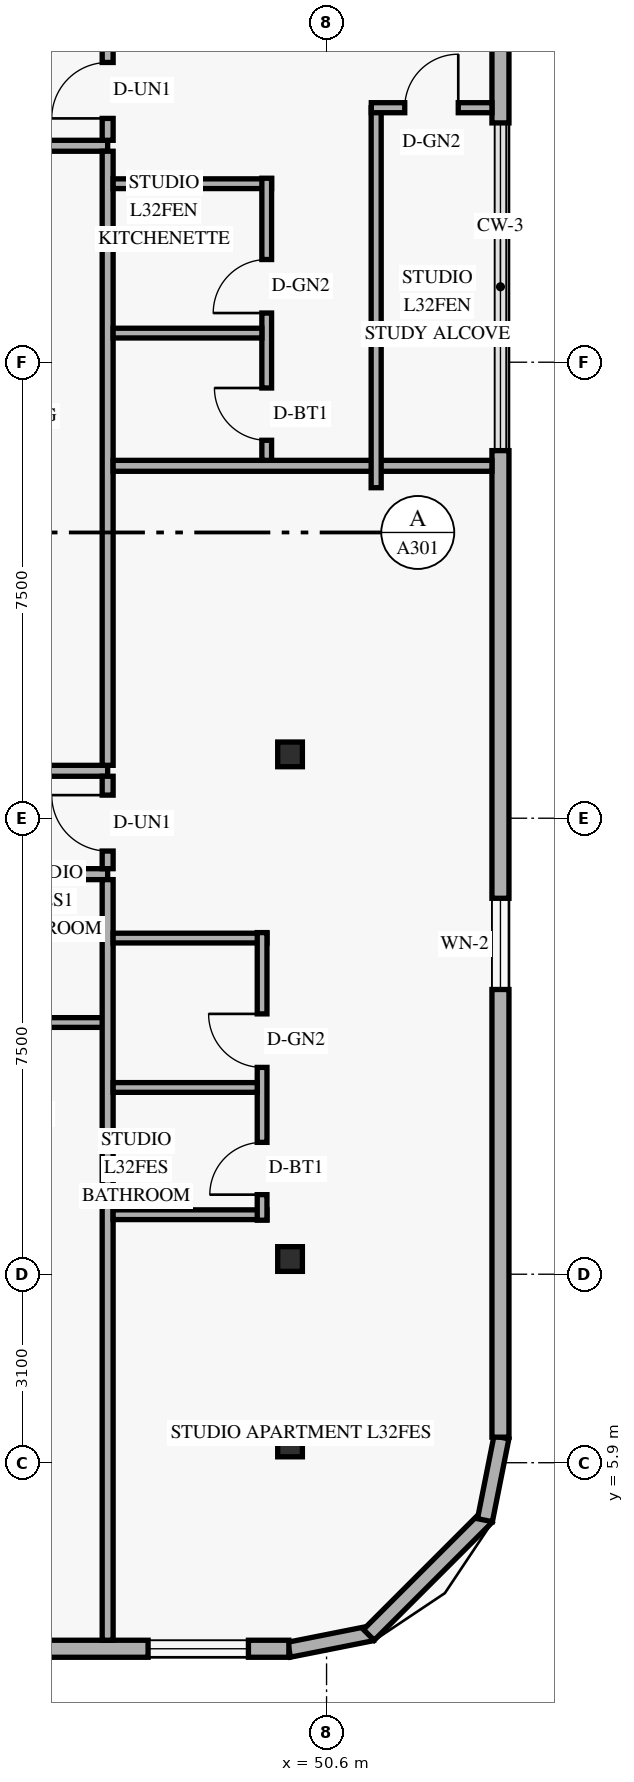
"""IFC4 building model, lengths in metres.
Left out: names, types, materials, properties, quantities, classifications, styles, units other than length and angle.
Written with IfcOpenShell. Run it as: python <this file> out.ifc"""

import sys

from ifc_helpers import new_model, si_unit, direction, frame, frame_2d, origin, origin_2d, place, context, subcontext, project, spatial, rectangle, hollow_rectangle, extrude, element, fill, save


model = new_model("IFC4")
c1 = context("Model", 3, precision=1e-05, world=origin(), true_north=direction((0.0, 1.0)))
c2 = subcontext(c1, "Body", "Model", "MODEL_VIEW")
j1 = project(units=[si_unit("LENGTHUNIT", "METRE"), si_unit("PLANEANGLEUNIT", "RADIAN")], contexts=[c1])
p1 = place(None, origin())
s1 = spatial("IfcSite", under=j1, at=p1, CompositionType="ELEMENT")
p2 = place(p1, origin())
s2 = spatial("IfcBuilding", under=s1, at=p2, CompositionType="ELEMENT")
p3 = place(p2, frame((0.0, 0.0, 124.8)))
s3 = spatial("IfcBuildingStorey", under=s2, at=p3, CompositionType="ELEMENT", Elevation=124.8)
for number, where, z_axis, x_axis in (
    (1, (49.895, 6.2, 0.0), (0.058, 0.0, 0.998), (0.0, 1.0, 0.0)),
    (2, (49.895, 9.25, 0.0), (0.058, 0.0, 0.998), (0.0, 1.0, 0.0)),
    (3, (49.895, 17.55, 0.0), (0.058, 0.0, 0.998), (0.0, 1.0, 0.0)),
):
    element("IfcColumn", number, at=place(p3, frame(where, z_axis=z_axis, x_axis=x_axis)), inside=s3, PredefinedType="COLUMN", context=c2, shape_type="SweptSolid", body=[
        extrude(hollow_rectangle(XDim=0.406, YDim=0.406, WallThickness=0.016, at=origin_2d()), origin(), (0.0, 0.0, 1.0), 3.606),
    ])
p4 = place(p3, frame((49.983, 2.824, 0.0), z_axis=(0.0, 0.0, 1.0), x_axis=(0.980809899341, 0.19496651342, 0.0)))
e4 = element("IfcWall", 4, at=p4, inside=s3, PredefinedType="SOLIDWALL", context=c2, shape_type="SweptSolid", body=[
    extrude(rectangle(XDim=1.389, YDim=0.25, at=frame_2d((0.694, 0.0))), origin(), (0.0, 0.0, 1.0), 3.36),
])
p5 = place(p3, frame((51.295, 3.068, 0.0), z_axis=(0.0, 0.0, 1.0), x_axis=(0.707151344399, 0.707062215165, 0.0)))
e5 = element("IfcWall", 5, at=p5, inside=s3, PredefinedType="SOLIDWALL", context=c2, shape_type="SweptSolid", body=[
    extrude(rectangle(XDim=2.739, YDim=0.25, at=frame_2d((1.37, 0.0))), origin(), (0.0, 0.0, 1.0), 3.36),
])
p6 = place(p3, frame((53.205, 4.955, 0.0), z_axis=(0.0, 0.0, 1.0), x_axis=(0.195000137217, 0.980803214965, 0.0)))
e6 = element("IfcWall", 6, at=p6, inside=s3, PredefinedType="SOLIDWALL", context=c2, shape_type="SweptSolid", body=[
    extrude(rectangle(XDim=1.388, YDim=0.25, at=frame_2d((0.694, 0.0))), origin(), (0.0, 0.0, 1.0), 3.36),
])
p7 = place(p3, frame((13.42, 2.84, 0.0), z_axis=(0.0, 0.0, 1.0), x_axis=(1.0, 0.0, 0.0)))
e7 = element("IfcWall", 7, at=p7, inside=s3, PredefinedType="SOLIDWALL", context=c2, shape_type="SweptSolid", body=[
    extrude(rectangle(XDim=36.56, YDim=0.28, at=frame_2d((18.28, 0.0))), origin(), (0.0, 0.0, 1.0), 3.36),
])
p8 = place(p7, frame((3.29, 0.0, 0.85)))
e8 = element("IfcOpeningElement", 8, at=p8, cuts=e7, PredefinedType="OPENING", context=c2, shape_type="SweptSolid", body=[
    extrude(rectangle(XDim=1.65, YDim=1.6, at=frame_2d((0.825, 0.8))), frame((0.0, 0.15, 0.0), z_axis=(0.0, -1.0, 0.0), x_axis=(1.0, 0.0, 0.0)), (0.0, 0.0, 1.0), 0.3),
])
p9 = place(p7, frame((10.48, 0.0, 0.85)))
e9 = element("IfcOpeningElement", 9, at=p9, cuts=e7, PredefinedType="OPENING", context=c2, shape_type="SweptSolid", body=[
    extrude(rectangle(XDim=1.65, YDim=1.6, at=frame_2d((0.825, 0.8))), frame((0.0, 0.15, 0.0), z_axis=(0.0, -1.0, 0.0), x_axis=(1.0, 0.0, 0.0)), (0.0, 0.0, 1.0), 0.3),
])
p10 = place(p7, frame((17.365, 0.0, 0.85)))
e10 = element("IfcOpeningElement", 10, at=p10, cuts=e7, PredefinedType="OPENING", context=c2, shape_type="SweptSolid", body=[
    extrude(rectangle(XDim=1.65, YDim=1.6, at=frame_2d((0.825, 0.8))), frame((0.0, 0.15, 0.0), z_axis=(0.0, -1.0, 0.0), x_axis=(1.0, 0.0, 0.0)), (0.0, 0.0, 1.0), 0.3),
])
p11 = place(p7, frame((22.64, 0.0, 0.85)))
e11 = element("IfcOpeningElement", 11, at=p11, cuts=e7, PredefinedType="OPENING", context=c2, shape_type="SweptSolid", body=[
    extrude(rectangle(XDim=1.65, YDim=1.6, at=frame_2d((0.825, 0.8))), frame((0.0, 0.15, 0.0), z_axis=(0.0, -1.0, 0.0), x_axis=(1.0, 0.0, 0.0)), (0.0, 0.0, 1.0), 0.3),
])
p12 = place(p7, frame((28.43, 0.0, 0.85)))
e12 = element("IfcOpeningElement", 12, at=p12, cuts=e7, PredefinedType="OPENING", context=c2, shape_type="SweptSolid", body=[
    extrude(rectangle(XDim=1.65, YDim=1.6, at=frame_2d((0.825, 0.8))), frame((0.0, 0.15, 0.0), z_axis=(0.0, -1.0, 0.0), x_axis=(1.0, 0.0, 0.0)), (0.0, 0.0, 1.0), 0.3),
])
p13 = place(p7, frame((34.245, 0.0, 0.85)))
e13 = element("IfcOpeningElement", 13, at=p13, cuts=e7, PredefinedType="OPENING", context=c2, shape_type="SweptSolid", body=[
    extrude(rectangle(XDim=1.65, YDim=1.6, at=frame_2d((0.825, 0.8))), frame((0.0, 0.15, 0.0), z_axis=(0.0, -1.0, 0.0), x_axis=(1.0, 0.0, 0.0)), (0.0, 0.0, 1.0), 0.3),
])
p14 = place(p3, frame((53.46, 6.32, 0.0), z_axis=(0.0, 0.0, 1.0), x_axis=(0.0, 1.0, 0.0)))
e14 = element("IfcWall", 14, at=p14, inside=s3, PredefinedType="SOLIDWALL", context=c2, shape_type="SweptSolid", body=[
    extrude(rectangle(XDim=16.226, YDim=0.28, at=frame_2d((8.113, 0.0))), origin(), (0.0, 0.0, 1.0), 3.36),
])
p15 = place(p14, frame((7.363, 0.0, 0.85)))
e15 = element("IfcOpeningElement", 15, at=p15, cuts=e14, PredefinedType="OPENING", context=c2, shape_type="SweptSolid", body=[
    extrude(rectangle(XDim=1.5, YDim=1.55, at=frame_2d((0.75, 0.775))), frame((0.0, 0.15, 0.0), z_axis=(0.0, -1.0, 0.0), x_axis=(1.0, 0.0, 0.0)), (0.0, 0.0, 1.0), 0.3),
])
p16 = place(p3, frame((53.46, 27.936, 0.0), z_axis=(0.0, 0.0, 1.0), x_axis=(0.0, 1.0, 0.0)))
e16 = element("IfcWall", 16, at=p16, inside=s3, PredefinedType="SOLIDWALL", context=c2, shape_type="SweptSolid", body=[
    extrude(rectangle(XDim=13.744, YDim=0.28, at=frame_2d((6.872, 0.0))), origin(), (0.0, 0.0, 1.0), 3.36),
])
p17 = place(p16, frame((6.122, 0.0, 0.85)))
e17 = element("IfcOpeningElement", 17, at=p17, cuts=e16, PredefinedType="OPENING", context=c2, shape_type="SweptSolid", body=[
    extrude(rectangle(XDim=1.5, YDim=1.55, at=frame_2d((0.75, 0.775))), frame((0.0, 0.15, 0.0), z_axis=(0.0, -1.0, 0.0), x_axis=(1.0, 0.0, 0.0)), (0.0, 0.0, 1.0), 0.3),
])
p18 = place(p3, frame((38.433, 15.58, 0.0), z_axis=(0.0, 0.0, 1.0), x_axis=(1.0, 0.0, 0.0)))
e18 = element("IfcWall", 18, at=p18, inside=s3, PredefinedType="STANDARD", context=c2, shape_type="SweptSolid", body=[
    extrude(rectangle(XDim=8.567, YDim=0.18, at=frame_2d((4.284, 0.0))), origin(), (0.0, 0.0, 1.0), 2.731),
])
p19 = place(p18, frame((0.357, 0.0, 0.0)))
e19 = element("IfcOpeningElement", 19, at=p19, cuts=e18, PredefinedType="OPENING", context=c2, shape_type="SweptSolid", body=[
    extrude(rectangle(XDim=0.92, YDim=2.15, at=frame_2d((0.46, 1.075))), frame((0.0, 0.1, 0.0), z_axis=(0.0, -1.0, 0.0), x_axis=(1.0, 0.0, 0.0)), (0.0, 0.0, 1.0), 0.2),
])
p20 = place(p3, frame((37.64, 17.28, 0.0), z_axis=(0.0, 0.0, 1.0), x_axis=(1.0, 0.0, 0.0)))
e20 = element("IfcWall", 20, at=p20, inside=s3, PredefinedType="STANDARD", context=c2, shape_type="SweptSolid", body=[
    extrude(rectangle(XDim=9.36, YDim=0.18, at=frame_2d((4.68, 0.0))), origin(), (0.0, 0.0, 1.0), 2.731),
])
p21 = place(p20, frame((7.377, 0.0, 0.0)))
e21 = element("IfcOpeningElement", 21, at=p21, cuts=e20, PredefinedType="OPENING", context=c2, shape_type="SweptSolid", body=[
    extrude(rectangle(XDim=0.92, YDim=2.15, at=frame_2d((0.46, 1.075))), frame((0.0, 0.1, 0.0), z_axis=(0.0, -1.0, 0.0), x_axis=(1.0, 0.0, 0.0)), (0.0, 0.0, 1.0), 0.2),
])
p22 = place(p3, frame((37.64, 27.56, 0.0), z_axis=(0.0, 0.0, 1.0), x_axis=(1.0, 0.0, 0.0)))
e22 = element("IfcWall", 22, at=p22, inside=s3, PredefinedType="STANDARD", context=c2, shape_type="SweptSolid", body=[
    extrude(rectangle(XDim=9.36, YDim=0.18, at=frame_2d((4.68, 0.0))), origin(), (0.0, 0.0, 1.0), 2.731),
])
p23 = place(p3, frame((42.33, 13.14, 0.0), z_axis=(0.0, 0.0, 1.0), x_axis=(1.0, 0.0, 0.0)))
e23 = element("IfcWall", 23, at=p23, inside=s3, PredefinedType="PLUMBINGWALL", context=c2, shape_type="SweptSolid", body=[
    extrude(rectangle(XDim=4.67, YDim=0.16, at=frame_2d((2.335, 0.0))), origin(), (0.0, 0.0, 1.0), 2.731),
])
p24 = place(p23, frame((0.35, 0.0, 0.0)))
e24 = element("IfcOpeningElement", 24, at=p24, cuts=e23, PredefinedType="OPENING", context=c2, shape_type="SweptSolid", body=[
    extrude(rectangle(XDim=0.88, YDim=2.12, at=frame_2d((0.44, 1.06))), frame((0.0, 0.09, 0.0), z_axis=(0.0, -1.0, 0.0), x_axis=(1.0, 0.0, 0.0)), (0.0, 0.0, 1.0), 0.18),
])
p25 = place(p23, frame((2.72, 0.0, 0.0)))
e25 = element("IfcOpeningElement", 25, at=p25, cuts=e23, PredefinedType="OPENING", context=c2, shape_type="SweptSolid", body=[
    extrude(rectangle(XDim=0.86, YDim=2.12, at=frame_2d((0.43, 1.06))), frame((0.0, 0.09, 0.0), z_axis=(0.0, -1.0, 0.0), x_axis=(1.0, 0.0, 0.0)), (0.0, 0.0, 1.0), 0.18),
])
p26 = place(p3, frame((47.0, 15.67, 0.0), z_axis=(0.0, 0.0, 1.0), x_axis=(0.0, 1.0, 0.0)))
e26 = element("IfcWall", 26, at=p26, inside=s3, PredefinedType="STANDARD", context=c2, shape_type="SweptSolid", body=[
    extrude(rectangle(XDim=1.52, YDim=0.18, at=frame_2d((0.76, 0.0))), origin(), (0.0, 0.0, 1.0), 3.36),
])
p27 = place(p26, frame((0.29, 0.0, 0.0)))
e27 = element("IfcOpeningElement", 27, at=p27, cuts=e26, PredefinedType="OPENING", context=c2, shape_type="SweptSolid", body=[
    extrude(rectangle(XDim=0.92, YDim=2.15, at=frame_2d((0.46, 1.075))), frame((0.0, 0.1, 0.0), z_axis=(0.0, -1.0, 0.0), x_axis=(1.0, 0.0, 0.0)), (0.0, 0.0, 1.0), 0.2),
])
p28 = place(p3, frame((47.0, 27.65, 0.0), z_axis=(0.0, 0.0, 1.0), x_axis=(0.0, 1.0, 0.0)))
e28 = element("IfcWall", 28, at=p28, inside=s3, PredefinedType="STANDARD", context=c2, shape_type="SweptSolid", body=[
    extrude(rectangle(XDim=1.72, YDim=0.18, at=frame_2d((0.86, 0.0))), origin(), (0.0, 0.0, 1.0), 3.36),
])
p29 = place(p28, frame((0.36, 0.0, 0.0)))
e29 = element("IfcOpeningElement", 29, at=p29, cuts=e28, PredefinedType="OPENING", context=c2, shape_type="SweptSolid", body=[
    extrude(rectangle(XDim=0.92, YDim=2.15, at=frame_2d((0.46, 1.075))), frame((0.0, 0.1, 0.0), z_axis=(0.0, -1.0, 0.0), x_axis=(1.0, 0.0, 0.0)), (0.0, 0.0, 1.0), 0.2),
])
p30 = place(p3, frame((47.0, 2.98, 0.0), z_axis=(0.0, 0.0, 1.0), x_axis=(0.0, 1.0, 0.0)))
e30 = element("IfcWall", 30, at=p30, inside=s3, PredefinedType="PARTITIONING", context=c2, shape_type="SweptSolid", body=[
    extrude(rectangle(XDim=12.51, YDim=0.18, at=frame_2d((6.255, 0.0))), origin(), (0.0, 0.0, 1.0), 2.731),
])
p31 = place(p3, frame((47.0, 17.37, 0.0), z_axis=(0.0, 0.0, 1.0), x_axis=(0.0, 1.0, 0.0)))
e31 = element("IfcWall", 31, at=p31, inside=s3, PredefinedType="PARTITIONING", context=c2, shape_type="SweptSolid", body=[
    extrude(rectangle(XDim=10.1, YDim=0.18, at=frame_2d((5.05, 0.0))), origin(), (0.0, 0.0, 1.0), 2.731),
])
p32 = place(p3, frame((47.09, 22.296, 0.0), z_axis=(0.0, 0.0, 1.0), x_axis=(1.0, 0.0, 0.0)))
e32 = element("IfcWall", 32, at=p32, inside=s3, PredefinedType="PARTITIONING", context=c2, shape_type="SweptSolid", body=[
    extrude(rectangle(XDim=6.23, YDim=0.18, at=frame_2d((3.115, 0.0))), origin(), (0.0, 0.0, 1.0), 2.809),
])
for number, where, z_axis, x_axis in (
    (33, (47.09, 9.979, 0.0), (0.0, 0.0, 1.0), (1.0, 0.0, 0.0)),
    (34, (47.09, 14.529, 0.0), (0.0, 0.0, 1.0), (1.0, 0.0, 0.0)),
):
    element("IfcWall", number, at=place(p3, frame(where, z_axis=z_axis, x_axis=x_axis)), inside=s3, PredefinedType="PLUMBINGWALL", context=c2, shape_type="SweptSolid", body=[
        extrude(rectangle(XDim=2.53, YDim=0.16, at=frame_2d((1.265, 0.0))), origin(), (0.0, 0.0, 1.0), 3.36),
    ])
p33 = place(p3, frame((49.54, 9.889, 0.0), z_axis=(0.0, 0.0, 1.0), x_axis=(0.0, 1.0, 0.0)))
e35 = element("IfcWall", 35, at=p33, inside=s3, PredefinedType="PLUMBINGWALL", context=c2, shape_type="SweptSolid", body=[
    extrude(rectangle(XDim=4.73, YDim=0.16, at=frame_2d((2.365, 0.0))), origin(), (0.0, 0.0, 1.0), 2.988),
])
p34 = place(p33, frame((0.42, 0.0, 0.0)))
e36 = element("IfcOpeningElement", 36, at=p34, cuts=e35, PredefinedType="OPENING", context=c2, shape_type="SweptSolid", body=[
    extrude(rectangle(XDim=0.86, YDim=2.12, at=frame_2d((0.43, 1.06))), frame((0.0, 0.09, 0.0), z_axis=(0.0, -1.0, 0.0), x_axis=(1.0, 0.0, 0.0)), (0.0, 0.0, 1.0), 0.18),
])
p35 = place(p33, frame((2.513, 0.0, 0.0)))
e37 = element("IfcOpeningElement", 37, at=p35, cuts=e35, PredefinedType="OPENING", context=c2, shape_type="SweptSolid", body=[
    extrude(rectangle(XDim=0.88, YDim=2.12, at=frame_2d((0.44, 1.06))), frame((0.0, 0.09, 0.0), z_axis=(0.0, -1.0, 0.0), x_axis=(1.0, 0.0, 0.0)), (0.0, 0.0, 1.0), 0.18),
])
p36 = place(p3, frame((47.09, 12.072, 0.0), z_axis=(0.0, 0.0, 1.0), x_axis=(1.0, 0.0, 0.0)))
e38 = element("IfcWall", 38, at=p36, inside=s3, PredefinedType="PLUMBINGWALL", context=c2, shape_type="SweptSolid", body=[
    extrude(rectangle(XDim=2.37, YDim=0.16, at=frame_2d((1.185, 0.0))), origin(), (0.0, 0.0, 1.0), 3.36),
])
p37 = place(p3, frame((47.09, 26.936, 0.0), z_axis=(0.0, 0.0, 1.0), x_axis=(1.0, 0.0, 0.0)))
e39 = element("IfcWall", 39, at=p37, inside=s3, PredefinedType="PLUMBINGWALL", context=c2, shape_type="SweptSolid", body=[
    extrude(rectangle(XDim=2.606, YDim=0.16, at=frame_2d((1.303, 0.0))), origin(), (0.0, 0.0, 1.0), 3.36),
])
p38 = place(p3, frame((49.616, 22.386, 0.0), z_axis=(0.0, 0.0, 1.0), x_axis=(0.0, 1.0, 0.0)))
e40 = element("IfcWall", 40, at=p38, inside=s3, PredefinedType="PLUMBINGWALL", context=c2, shape_type="SweptSolid", body=[
    extrude(rectangle(XDim=4.64, YDim=0.16, at=frame_2d((2.32, 0.0))), origin(), (0.0, 0.0, 1.0), 3.36),
])
p39 = place(p38, frame((0.33, 0.0, 0.0)))
e41 = element("IfcOpeningElement", 41, at=p39, cuts=e40, PredefinedType="OPENING", context=c2, shape_type="SweptSolid", body=[
    extrude(rectangle(XDim=0.86, YDim=2.12, at=frame_2d((0.43, 1.06))), frame((0.0, 0.09, 0.0), z_axis=(0.0, -1.0, 0.0), x_axis=(1.0, 0.0, 0.0)), (0.0, 0.0, 1.0), 0.18),
])
p40 = place(p38, frame((2.423, 0.0, 0.0)))
e42 = element("IfcOpeningElement", 42, at=p40, cuts=e40, PredefinedType="OPENING", context=c2, shape_type="SweptSolid", body=[
    extrude(rectangle(XDim=0.88, YDim=2.12, at=frame_2d((0.44, 1.06))), frame((0.0, 0.09, 0.0), z_axis=(0.0, -1.0, 0.0), x_axis=(1.0, 0.0, 0.0)), (0.0, 0.0, 1.0), 0.18),
])
p41 = place(p3, frame((47.09, 24.479, 0.0), z_axis=(0.0, 0.0, 1.0), x_axis=(1.0, 0.0, 0.0)))
e43 = element("IfcWall", 43, at=p41, inside=s3, PredefinedType="PLUMBINGWALL", context=c2, shape_type="SweptSolid", body=[
    extrude(rectangle(XDim=2.446, YDim=0.16, at=frame_2d((1.223, 0.0))), origin(), (0.0, 0.0, 1.0), 3.36),
])
p42 = place(p3, frame((51.416, 21.936, 0.0), z_axis=(0.0, 0.0, 1.0), x_axis=(0.0, 1.0, 0.0)))
e44 = element("IfcWall", 44, at=p42, inside=s3, PredefinedType="PARTITIONING", context=c2, shape_type="SweptSolid", body=[
    extrude(rectangle(XDim=6.25, YDim=0.165, at=frame_2d((3.125, 0.0))), origin(), (0.0, 0.0, 1.0), 3.36),
])
p43 = place(p3, frame((51.336, 28.186, 0.0), z_axis=(0.0, 0.0, 1.0), x_axis=(1.0, 0.0, 0.0)))
e45 = element("IfcWall", 45, at=p43, inside=s3, PredefinedType="PARTITIONING", context=c2, shape_type="SweptSolid", body=[
    extrude(rectangle(XDim=1.984, YDim=0.165, at=frame_2d((0.992, 0.0))), origin(), (0.0, 0.0, 1.0), 3.36),
])
p44 = place(p43, frame((0.55, 0.0, 0.0)))
e46 = element("IfcOpeningElement", 46, at=p44, cuts=e45, PredefinedType="OPENING", context=c2, shape_type="SweptSolid", body=[
    extrude(rectangle(XDim=0.88, YDim=2.12, at=frame_2d((0.44, 1.06))), frame((0.0, 0.093, 0.0), z_axis=(0.0, -1.0, 0.0), x_axis=(1.0, 0.0, 0.0)), (0.0, 0.0, 1.0), 0.185),
])
p45 = place(p13, origin())
e47 = element("IfcWindow", 47, at=p45, inside=s3, PartitioningType="SINGLE_PANEL", PredefinedType="WINDOW", context=c2, shape_type="SweptSolid", body=[
    extrude(rectangle(XDim=1.65, YDim=1.6, at=frame_2d((0.825, 0.8))), frame((0.0, 0.03, 0.0), z_axis=(0.0, -1.0, 0.0), x_axis=(1.0, 0.0, 0.0)), (0.0, 0.0, 1.0), 0.06),
])
fill(e13, e47)
p46 = place(p15, origin())
e48 = element("IfcWindow", 48, at=p46, inside=s3, PartitioningType="SINGLE_PANEL", PredefinedType="WINDOW", context=c2, shape_type="SweptSolid", body=[
    extrude(rectangle(XDim=1.5, YDim=1.55, at=frame_2d((0.75, 0.775))), frame((0.0, 0.03, 0.0), z_axis=(0.0, -1.0, 0.0), x_axis=(1.0, 0.0, 0.0)), (0.0, 0.0, 1.0), 0.06),
])
fill(e15, e48)
p47 = place(p27, origin())
e49 = element("IfcDoor", 49, at=p47, inside=s3, OperationType="SINGLE_SWING_RIGHT", PredefinedType="DOOR", context=c2, shape_type="SweptSolid", body=[
    extrude(rectangle(XDim=0.92, YDim=2.15, at=frame_2d((0.46, 1.075))), frame((0.0, 0.025, 0.0), z_axis=(0.0, -1.0, 0.0), x_axis=(1.0, 0.0, 0.0)), (0.0, 0.0, 1.0), 0.05),
])
fill(e27, e49)
p48 = place(p34, origin())
e50 = element("IfcDoor", 50, at=p48, inside=s3, OperationType="SINGLE_SWING_LEFT", PredefinedType="DOOR", context=c2, shape_type="SweptSolid", body=[
    extrude(rectangle(XDim=0.86, YDim=2.12, at=frame_2d((0.43, 1.06))), frame((0.0, 0.025, 0.0), z_axis=(0.0, -1.0, 0.0), x_axis=(1.0, 0.0, 0.0)), (0.0, 0.0, 1.0), 0.05),
])
fill(e36, e50)
p49 = place(p35, origin())
e51 = element("IfcDoor", 51, at=p49, inside=s3, OperationType="SINGLE_SWING_RIGHT", PredefinedType="DOOR", context=c2, shape_type="SweptSolid", body=[
    extrude(rectangle(XDim=0.88, YDim=2.12, at=frame_2d((0.44, 1.06))), frame((0.0, 0.025, 0.0), z_axis=(0.0, -1.0, 0.0), x_axis=(1.0, 0.0, 0.0)), (0.0, 0.0, 1.0), 0.05),
])
fill(e37, e51)
p50 = place(p44, origin())
e52 = element("IfcDoor", 52, at=p50, inside=s3, OperationType="SINGLE_SWING_RIGHT", PredefinedType="DOOR", context=c2, shape_type="SweptSolid", body=[
    extrude(rectangle(XDim=0.88, YDim=2.12, at=frame_2d((0.44, 1.06))), frame((0.0, 0.025, 0.0), z_axis=(0.0, -1.0, 0.0), x_axis=(1.0, 0.0, 0.0)), (0.0, 0.0, 1.0), 0.05),
])
fill(e46, e52)
p51 = place(p29, origin())
e53 = element("IfcDoor", 53, at=p51, inside=s3, OperationType="SINGLE_SWING_LEFT", PredefinedType="DOOR", context=c2, shape_type="SweptSolid", body=[
    extrude(rectangle(XDim=0.92, YDim=2.15, at=frame_2d((0.46, 1.075))), frame((0.0, 0.025, 0.0), z_axis=(0.0, -1.0, 0.0), x_axis=(1.0, 0.0, 0.0)), (0.0, 0.0, 1.0), 0.05),
])
fill(e29, e53)
p52 = place(p39, origin())
e54 = element("IfcDoor", 54, at=p52, inside=s3, OperationType="SINGLE_SWING_RIGHT", PredefinedType="DOOR", context=c2, shape_type="SweptSolid", body=[
    extrude(rectangle(XDim=0.86, YDim=2.12, at=frame_2d((0.43, 1.06))), frame((0.0, 0.025, 0.0), z_axis=(0.0, -1.0, 0.0), x_axis=(1.0, 0.0, 0.0)), (0.0, 0.0, 1.0), 0.05),
])
fill(e41, e54)
p53 = place(p40, origin())
e55 = element("IfcDoor", 55, at=p53, inside=s3, OperationType="SINGLE_SWING_LEFT", PredefinedType="DOOR", context=c2, shape_type="SweptSolid", body=[
    extrude(rectangle(XDim=0.88, YDim=2.12, at=frame_2d((0.44, 1.06))), frame((0.0, 0.025, 0.0), z_axis=(0.0, -1.0, 0.0), x_axis=(1.0, 0.0, 0.0)), (0.0, 0.0, 1.0), 0.05),
])
fill(e42, e55)
save(model, sys.argv[1])
